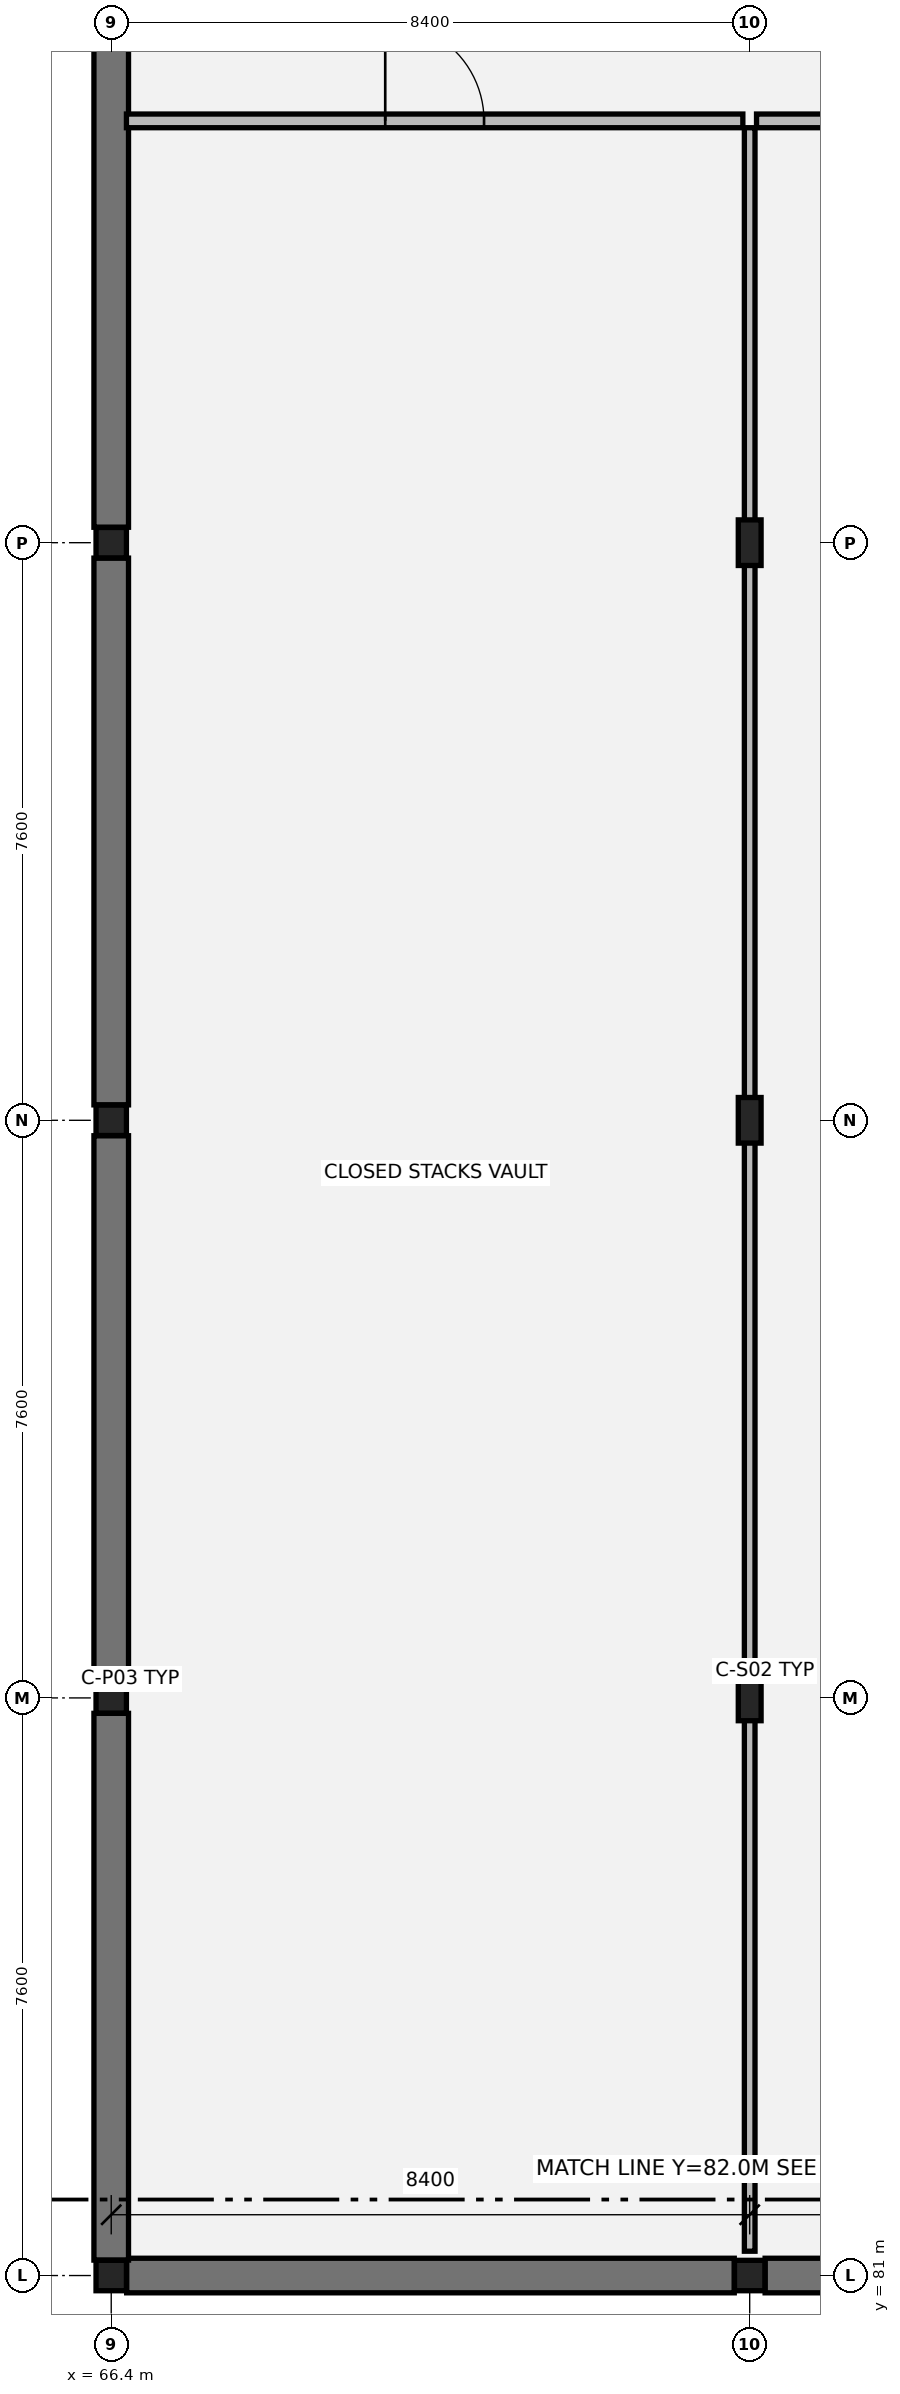
"""IFC4 building model, lengths in metres.
Left out: names, types, materials, properties, quantities, classifications, styles, units other than length and angle.
Written with IfcOpenShell. Run it as: python <this file> out.ifc"""

import sys

from ifc_helpers import new_model, si_unit, direction, frame, frame_2d, origin, origin_2d, place, context, subcontext, project, spatial, rectangle, hollow_rectangle, i_section, extrude, element, fill, save


model = new_model("IFC4")
c1 = context("Model", 3, precision=1e-05, world=origin(), true_north=direction((0.0, 1.0)))
c2 = subcontext(c1, "Body", "Model", "MODEL_VIEW")
j1 = project(units=[si_unit("LENGTHUNIT", "METRE"), si_unit("PLANEANGLEUNIT", "RADIAN")], contexts=[c1])
p1 = place(None, origin())
s1 = spatial("IfcSite", under=j1, at=p1, CompositionType="ELEMENT")
p2 = place(p1, origin())
s2 = spatial("IfcBuilding", under=s1, at=p2, CompositionType="ELEMENT")
p3 = place(p2, frame((0.0, 0.0, -4.42)))
s3 = spatial("IfcBuildingStorey", under=s2, at=p3, CompositionType="ELEMENT", Elevation=-4.42)
for number, where, z_axis, x_axis in (
    (1, (66.4, 81.0, 0.0), (0.0, 0.0, 1.0), (1.0, 0.0, 0.0)),
    (2, (66.4, 88.6, 0.0), (0.0, 0.0, 1.0), (1.0, 0.0, 0.0)),
    (3, (66.4, 96.2, 0.0), (0.0, 0.0, 1.0), (1.0, 0.0, 0.0)),
    (4, (66.4, 103.8, 0.0), (0.0, 0.0, 1.0), (1.0, 0.0, 0.0)),
    (5, (74.8, 81.0, 0.0), (0.0, 0.0, 1.0), (1.0, 0.0, 0.0)),
):
    element("IfcColumn", number, at=place(p3, frame(where, z_axis=z_axis, x_axis=x_axis)), inside=s3, PredefinedType="COLUMN", context=c2, shape_type="SweptSolid", body=[
        extrude(hollow_rectangle(XDim=0.4, YDim=0.4, WallThickness=0.016, at=origin_2d()), origin(), (0.0, 0.0, 1.0), 4.395),
    ])
for number, where, z_axis, x_axis in (
    (6, (74.8, 88.6, 0.0), (0.0, 0.0, 1.0), (1.0, 0.0, 0.0)),
    (7, (74.8, 96.2, 0.0), (0.0, 0.0, 1.0), (1.0, 0.0, 0.0)),
    (8, (74.8, 103.8, 0.0), (0.0, 0.0, 1.0), (1.0, 0.0, 0.0)),
):
    element("IfcColumn", number, at=place(p3, frame(where, z_axis=z_axis, x_axis=x_axis)), inside=s3, PredefinedType="COLUMN", context=c2, shape_type="SweptSolid", body=[
        extrude(i_section(OverallWidth=0.3, OverallDepth=0.6, WebThickness=0.015, FlangeThickness=0.03, at=origin_2d()), origin(), (0.0, 0.0, 1.0), 4.395),
    ])
p4 = place(p3, frame((66.603, 81.0, 0.0), z_axis=(0.0, 0.0, 1.0), x_axis=(1.0, 0.0, 0.0)))
e9 = element("IfcWall", 9, at=p4, inside=s3, PredefinedType="USERDEFINED", context=c2, shape_type="SweptSolid", body=[
    extrude(rectangle(XDim=7.994, YDim=0.455, at=frame_2d((3.997, 0.0))), origin(), (0.0, 0.0, 1.0), 3.82),
])
p5 = place(p3, frame((75.003, 81.0, 0.0), z_axis=(0.0, 0.0, 1.0), x_axis=(1.0, 0.0, 0.0)))
e10 = element("IfcWall", 10, at=p5, inside=s3, PredefinedType="USERDEFINED", context=c2, shape_type="SweptSolid", body=[
    extrude(rectangle(XDim=7.994, YDim=0.455, at=frame_2d((3.997, 0.0))), origin(), (0.0, 0.0, 1.0), 3.82),
])
for number, where, z_axis, x_axis in (
    (11, (66.4, 81.203, 0.0), (0.0, 0.0, 1.0), (0.0, 1.0, 0.0)),
    (12, (66.4, 88.803, 0.0), (0.0, 0.0, 1.0), (0.0, 1.0, 0.0)),
):
    element("IfcWall", number, at=place(p3, frame(where, z_axis=z_axis, x_axis=x_axis)), inside=s3, PredefinedType="USERDEFINED", context=c2, shape_type="SweptSolid", body=[
        extrude(rectangle(XDim=7.194, YDim=0.455, at=frame_2d((3.597, 0.0))), origin(), (0.0, 0.0, 1.0), 3.82),
    ])
p6 = place(p3, frame((66.4, 96.403, 0.0), z_axis=(0.0, 0.0, 1.0), x_axis=(0.0, 1.0, 0.0)))
e13 = element("IfcWall", 13, at=p6, inside=s3, PredefinedType="USERDEFINED", context=c2, shape_type="SweptSolid", body=[
    extrude(rectangle(XDim=7.194, YDim=0.455, at=frame_2d((3.597, 0.0))), origin(), (0.0, 0.0, 1.0), 3.82),
])
p7 = place(p3, frame((66.4, 104.003, 0.0), z_axis=(0.0, 0.0, 1.0), x_axis=(0.0, 1.0, 0.0)))
e14 = element("IfcWall", 14, at=p7, inside=s3, PredefinedType="USERDEFINED", context=c2, shape_type="SweptSolid", body=[
    extrude(rectangle(XDim=7.194, YDim=0.455, at=frame_2d((3.597, 0.0))), origin(), (0.0, 0.0, 1.0), 3.82),
])
p8 = place(p3, frame((66.6, 109.35, 0.0), z_axis=(0.0, 0.0, 1.0), x_axis=(1.0, 0.0, 0.0)))
e15 = element("IfcWall", 15, at=p8, inside=s3, PredefinedType="PARTITIONING", context=c2, shape_type="SweptSolid", body=[
    extrude(rectangle(XDim=8.11, YDim=0.18, at=frame_2d((4.055, 0.0))), origin(), (0.0, 0.0, 1.0), 3.52),
])
p9 = place(p8, frame((3.405, 0.0, 0.0)))
e16 = element("IfcOpeningElement", 16, at=p9, cuts=e15, PredefinedType="OPENING", context=c2, shape_type="SweptSolid", body=[
    extrude(rectangle(XDim=1.3, YDim=2.2, at=frame_2d((0.65, 1.1))), frame((0.0, 0.1, 0.0), z_axis=(0.0, -1.0, 0.0), x_axis=(1.0, 0.0, 0.0)), (0.0, 0.0, 1.0), 0.2),
])
p10 = place(p3, frame((74.89, 109.35, 0.0), z_axis=(0.0, 0.0, 1.0), x_axis=(1.0, 0.0, 0.0)))
e17 = element("IfcWall", 17, at=p10, inside=s3, PredefinedType="PARTITIONING", context=c2, shape_type="SweptSolid", body=[
    extrude(rectangle(XDim=16.62, YDim=0.18, at=frame_2d((8.31, 0.0))), origin(), (0.0, 0.0, 1.0), 3.52),
])
p11 = place(p10, frame((7.61, 0.0, 0.0)))
e18 = element("IfcOpeningElement", 18, at=p11, cuts=e17, PredefinedType="OPENING", context=c2, shape_type="SweptSolid", body=[
    extrude(rectangle(XDim=1.4, YDim=2.22, at=frame_2d((0.7, 1.11))), frame((0.0, 0.1, 0.0), z_axis=(0.0, -1.0, 0.0), x_axis=(1.0, 0.0, 0.0)), (0.0, 0.0, 1.0), 0.2),
])
p12 = place(p3, frame((74.8, 81.32, 0.0), z_axis=(0.0, 0.0, 1.0), x_axis=(0.0, 1.0, 0.0)))
e19 = element("IfcWall", 19, at=p12, inside=s3, PredefinedType="PARTITIONING", context=c2, shape_type="SweptSolid", body=[
    extrude(rectangle(XDim=27.94, YDim=0.14, at=frame_2d((13.97, 0.0))), origin(), (0.0, 0.0, 1.0), 3.52),
])
p13 = place(p9, origin())
e20 = element("IfcDoor", 20, at=p13, inside=s3, OperationType="SINGLE_SWING_LEFT", PredefinedType="DOOR", context=c2, shape_type="SweptSolid", body=[
    extrude(rectangle(XDim=1.3, YDim=2.2, at=frame_2d((0.65, 1.1))), frame((0.0, 0.025, 0.0), z_axis=(0.0, -1.0, 0.0), x_axis=(1.0, 0.0, 0.0)), (0.0, 0.0, 1.0), 0.05),
])
fill(e16, e20)
save(model, sys.argv[1])
